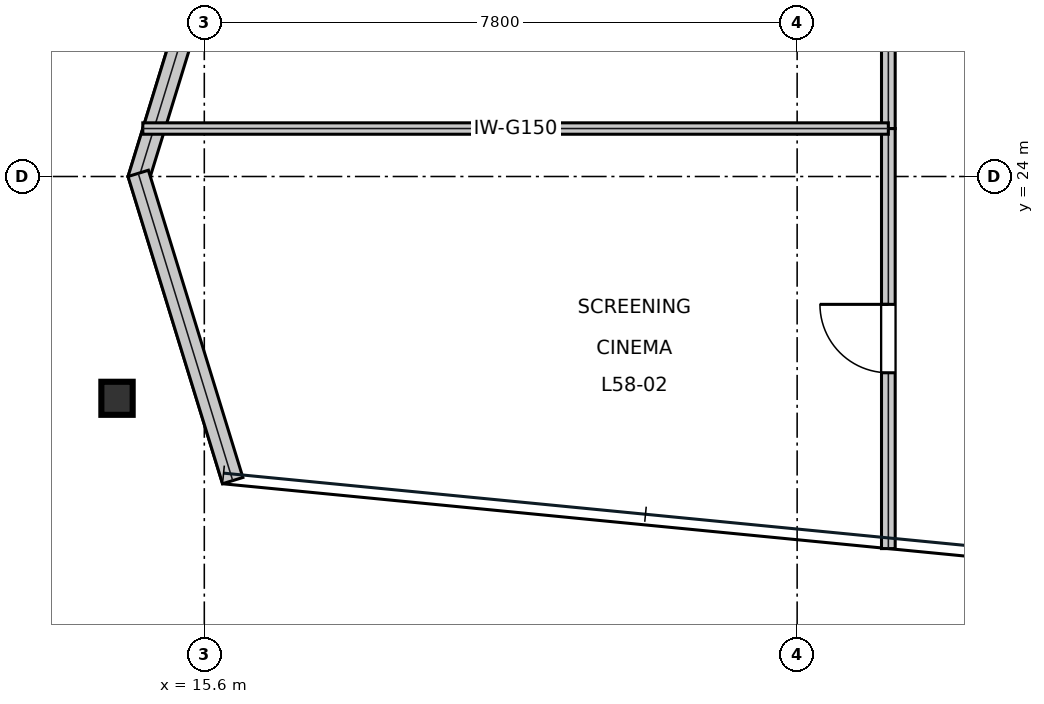
"""IFC4 building model, lengths in metres.
Left out: names, types, materials, properties, quantities, classifications, styles, units other than length and angle.
Written with IfcOpenShell. Run it as: python <this file> out.ifc"""

import sys

from ifc_helpers import new_model, si_unit, direction, frame, frame_2d, origin, origin_2d, place, context, subcontext, project, spatial, rectangle, i_section, extrude, element, fill, save


model = new_model("IFC4")
c1 = context("Model", 3, precision=1e-05, world=origin(), true_north=direction((0.0, 1.0)))
c2 = subcontext(c1, "Body", "Model", "MODEL_VIEW")
j1 = project(units=[si_unit("LENGTHUNIT", "METRE"), si_unit("PLANEANGLEUNIT", "RADIAN")], contexts=[c1])
p1 = place(None, origin())
s1 = spatial("IfcSite", under=j1, at=p1, CompositionType="ELEMENT")
p2 = place(p1, origin())
s2 = spatial("IfcBuilding", under=s1, at=p2, CompositionType="ELEMENT")
p3 = place(p2, frame((0.0, 0.0, 248.55)))
s3 = spatial("IfcBuildingStorey", under=s2, at=p3, CompositionType="ELEMENT", Elevation=248.55)
p4 = place(p3, frame((14.452, 21.082, 0.016), z_axis=(0.044614433031, 0.003217095171, 0.998999100432), x_axis=(-0.071922099832, 0.997410252382, 0.0)))
e1 = element("IfcColumn", 1, at=p4, inside=s3, PredefinedType="COLUMN", context=c2, shape_type="SweptSolid", body=[
    extrude(i_section(OverallWidth=0.412, OverallDepth=0.435, WebThickness=0.036, FlangeThickness=0.058, at=origin_2d()), origin(), (0.0, 0.0, 1.0), 4.022),
])
for number, where, z_axis, x_axis in (
    (2, (15.974, 28.001, 0.0), (0.0, 0.0, 1.0), (-0.294, -0.956, 0.0)),
    (3, (14.731, 24.041, 0.0), (0.0, 0.0, 1.0), (0.294, -0.956, 0.0)),
):
    element("IfcWall", number, at=place(p3, frame(where, z_axis=z_axis, x_axis=x_axis)), inside=s3, PredefinedType="STANDARD", context=c2, shape_type="SweptSolid", body=[
        extrude(rectangle(XDim=4.229, YDim=0.28, at=frame_2d((2.114, 0.0))), origin(), (0.0, 0.0, 1.0), 3.241),
    ])
p5 = place(p3, frame((24.6, 19.104, 0.0), z_axis=(0.0, 0.0, 1.0), x_axis=(0.0, 1.0, 0.0)))
e4 = element("IfcWall", 4, at=p5, inside=s3, PredefinedType="SOLIDWALL", context=c2, shape_type="SweptSolid", body=[
    extrude(rectangle(XDim=5.527, YDim=0.18, at=frame_2d((2.763, 0.0))), origin(), (0.0, 0.0, 1.0), 3.241),
])
p6 = place(p5, frame((2.313, 0.0, 0.0)))
e5 = element("IfcOpeningElement", 5, at=p6, cuts=e4, PredefinedType="OPENING", context=c2, shape_type="SweptSolid", body=[
    extrude(rectangle(XDim=0.9, YDim=2.15, at=frame_2d((0.45, 1.075))), frame((0.0, 0.1, 0.0), z_axis=(0.0, -1.0, 0.0), x_axis=(1.0, 0.0, 0.0)), (0.0, 0.0, 1.0), 0.2),
])
p7 = place(p3, frame((24.6, 24.631, 0.0), z_axis=(0.0, 0.0, 1.0), x_axis=(0.0, 1.0, 0.0)))
e6 = element("IfcWall", 6, at=p7, inside=s3, PredefinedType="SOLIDWALL", context=c2, shape_type="SweptSolid", body=[
    extrude(rectangle(XDim=4.264, YDim=0.18, at=frame_2d((2.132, 0.0))), origin(), (0.0, 0.0, 1.0), 3.241),
])
p8 = place(p7, frame((1.682, 0.0, 0.0)))
e7 = element("IfcOpeningElement", 7, at=p8, cuts=e6, PredefinedType="OPENING", context=c2, shape_type="SweptSolid", body=[
    extrude(rectangle(XDim=0.9, YDim=2.15, at=frame_2d((0.45, 1.075))), frame((0.0, 0.1, 0.0), z_axis=(0.0, -1.0, 0.0), x_axis=(1.0, 0.0, 0.0)), (0.0, 0.0, 1.0), 0.2),
])
p9 = place(p3, frame((14.791, 24.631, 0.0), z_axis=(0.0, 0.0, 1.0), x_axis=(1.0, 0.0, 0.0)))
e8 = element("IfcWall", 8, at=p9, inside=s3, PredefinedType="MOVABLE", context=c2, shape_type="SweptSolid", body=[
    extrude(rectangle(XDim=9.809, YDim=0.15, at=frame_2d((4.905, 0.0))), origin(), (0.0, 0.0, 1.0), 3.468),
])
p10 = place(p6, origin())
e9 = element("IfcDoor", 9, at=p10, inside=s3, OperationType="SINGLE_SWING_RIGHT", PredefinedType="DOOR", context=c2, shape_type="SweptSolid", body=[
    extrude(rectangle(XDim=0.9, YDim=2.15, at=frame_2d((0.45, 1.075))), frame((0.0, 0.025, 0.0), z_axis=(0.0, -1.0, 0.0), x_axis=(1.0, 0.0, 0.0)), (0.0, 0.0, 1.0), 0.05),
])
fill(e5, e9)
save(model, sys.argv[1])
